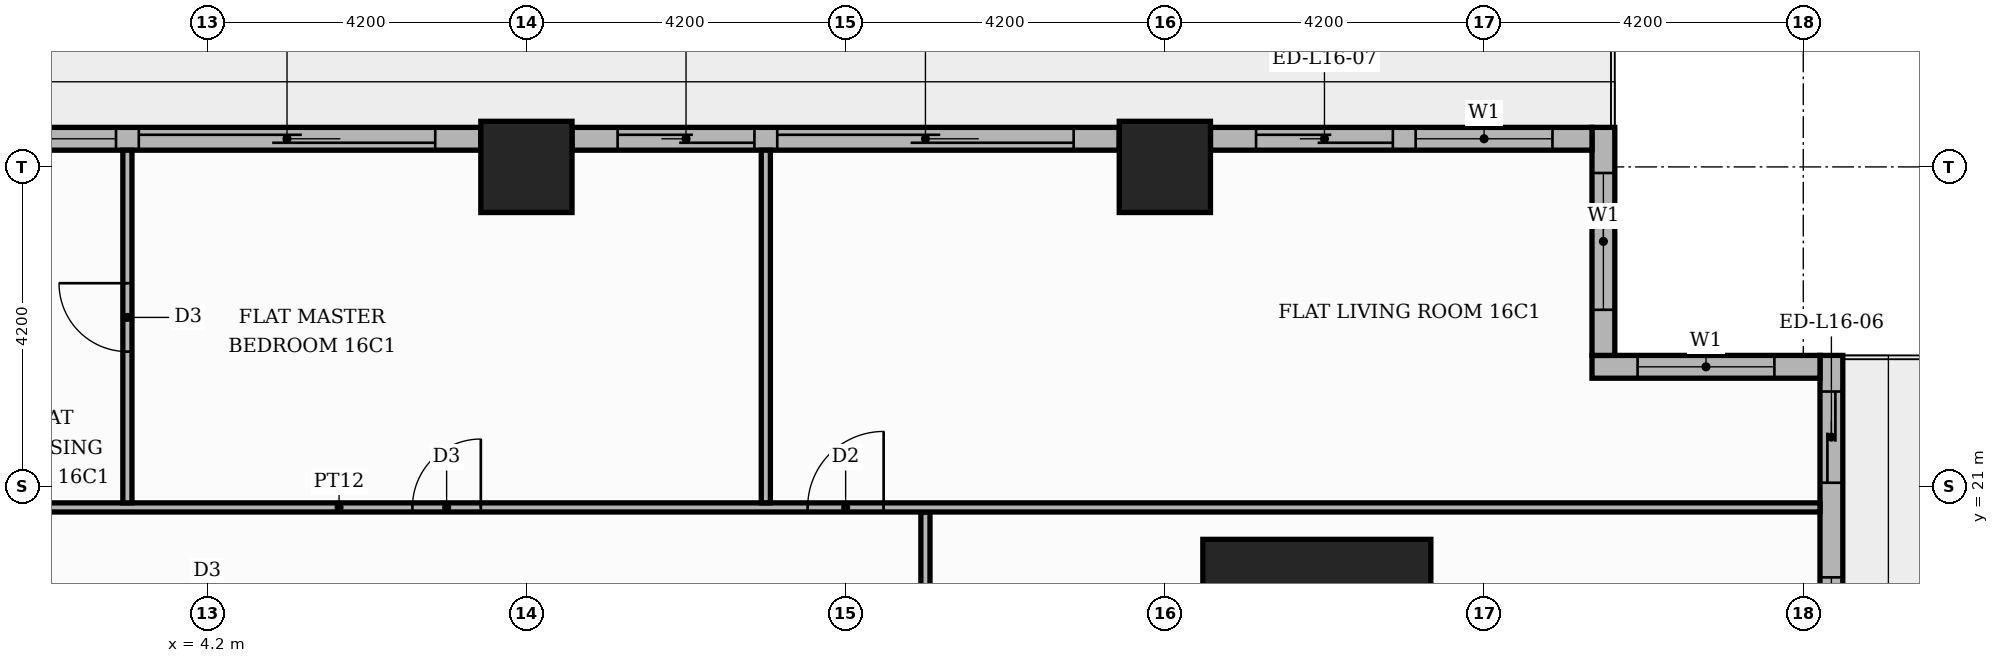
"""IFC4 building model, lengths in metres.
Left out: names, types, materials, properties, quantities, classifications, styles, units other than length and angle.
Written with IfcOpenShell. Run it as: python <this file> out.ifc"""

import sys

from ifc_helpers import new_model, si_unit, direction, frame, frame_2d, origin, origin_2d, place, context, subcontext, project, spatial, rectangle, extrude, element, fill, save


model = new_model("IFC4")
c1 = context("Model", 3, precision=1e-05, world=origin(), true_north=direction((0.0, 1.0)))
c2 = subcontext(c1, "Body", "Model", "MODEL_VIEW")
j1 = project(units=[si_unit("LENGTHUNIT", "METRE"), si_unit("PLANEANGLEUNIT", "RADIAN")], contexts=[c1])
p1 = place(None, origin())
s1 = spatial("IfcSite", under=j1, at=p1, CompositionType="ELEMENT")
p2 = place(p1, origin())
s2 = spatial("IfcBuilding", under=s1, at=p2, CompositionType="ELEMENT")
p3 = place(p2, frame((0.0, 0.0, 69.9)))
s3 = spatial("IfcBuildingStorey", under=s2, at=p3, CompositionType="ELEMENT", Elevation=69.9)
p4 = place(p3, frame((18.8, 18.8, 0.0), z_axis=(0.0, 0.0, 1.0), x_axis=(1.0, 0.0, 0.0)))
e1 = element("IfcColumn", 1, at=p4, inside=s3, PredefinedType="COLUMN", context=c2, shape_type="SweptSolid", body=[
    extrude(rectangle(XDim=3.0, YDim=3.0, at=origin_2d()), origin(), (0.0, 0.0, 1.0), 3.9),
])
for number, where, z_axis, x_axis in (
    (2, (8.4, 25.2, 0.0), (0.0, 0.0, 1.0), (1.0, 0.0, 0.0)),
    (3, (16.8, 25.2, 0.0), (0.0, 0.0, 1.0), (1.0, 0.0, 0.0)),
):
    element("IfcColumn", number, at=place(p3, frame(where, z_axis=z_axis, x_axis=x_axis)), inside=s3, PredefinedType="COLUMN", context=c2, shape_type="SweptSolid", body=[
        extrude(rectangle(XDim=1.2, YDim=1.2, at=origin_2d()), origin(), (0.0, 0.0, 1.0), 3.9),
    ])
p5 = place(p3, frame((25.57, 17.4, 0.0), z_axis=(0.0, 0.0, 1.0), x_axis=(0.0, 1.0, 0.0)))
e4 = element("IfcWall", 4, at=p5, inside=s3, PredefinedType="STANDARD", context=c2, shape_type="SweptSolid", body=[
    extrude(rectangle(XDim=5.32, YDim=0.3, at=frame_2d((2.66, 0.0))), origin(), (0.0, 0.0, 1.0), 3.4),
])
p6 = place(p5, frame((0.6, 0.0, 0.9)))
e5 = element("IfcOpeningElement", 5, at=p6, cuts=e4, PredefinedType="OPENING", context=c2, shape_type="SweptSolid", body=[
    extrude(rectangle(XDim=1.8, YDim=2.1, at=frame_2d((0.9, 1.05))), frame((0.0, 0.16, 0.0), z_axis=(0.0, -1.0, 0.0), x_axis=(1.0, 0.0, 0.0)), (0.0, 0.0, 1.0), 0.32),
])
p7 = place(p5, frame((3.645, 0.0, 0.0)))
e6 = element("IfcOpeningElement", 6, at=p7, cuts=e4, PredefinedType="OPENING", context=c2, shape_type="SweptSolid", body=[
    extrude(rectangle(XDim=1.2, YDim=2.4, at=frame_2d((0.6, 1.2))), frame((0.0, 0.16, 0.0), z_axis=(0.0, -1.0, 0.0), x_axis=(1.0, 0.0, 0.0)), (0.0, 0.0, 1.0), 0.32),
])
p8 = place(p3, frame((25.42, 22.57, 0.0), z_axis=(0.0, 0.0, 1.0), x_axis=(-1.0, 0.0, 0.0)))
e7 = element("IfcWall", 7, at=p8, inside=s3, PredefinedType="STANDARD", context=c2, shape_type="SweptSolid", body=[
    extrude(rectangle(XDim=3.0, YDim=0.3, at=frame_2d((1.5, 0.0))), origin(), (0.0, 0.0, 1.0), 3.4),
])
p9 = place(p8, frame((0.6, 0.0, 0.9)))
e8 = element("IfcOpeningElement", 8, at=p9, cuts=e7, PredefinedType="OPENING", context=c2, shape_type="SweptSolid", body=[
    extrude(rectangle(XDim=1.8, YDim=2.1, at=frame_2d((0.9, 1.05))), frame((0.0, 0.16, 0.0), z_axis=(0.0, -1.0, 0.0), x_axis=(1.0, 0.0, 0.0)), (0.0, 0.0, 1.0), 0.32),
])
p10 = place(p3, frame((22.57, 22.72, 0.0), z_axis=(0.0, 0.0, 1.0), x_axis=(0.0, 1.0, 0.0)))
e9 = element("IfcWall", 9, at=p10, inside=s3, PredefinedType="STANDARD", context=c2, shape_type="SweptSolid", body=[
    extrude(rectangle(XDim=3.0, YDim=0.3, at=frame_2d((1.5, 0.0))), origin(), (0.0, 0.0, 1.0), 3.4),
])
p11 = place(p10, frame((0.6, 0.0, 0.9)))
e10 = element("IfcOpeningElement", 10, at=p11, cuts=e9, PredefinedType="OPENING", context=c2, shape_type="SweptSolid", body=[
    extrude(rectangle(XDim=1.8, YDim=2.1, at=frame_2d((0.9, 1.05))), frame((0.0, 0.16, 0.0), z_axis=(0.0, -1.0, 0.0), x_axis=(1.0, 0.0, 0.0)), (0.0, 0.0, 1.0), 0.32),
])
p12 = place(p3, frame((22.42, 25.57, 0.0), z_axis=(0.0, 0.0, 1.0), x_axis=(-1.0, 0.0, 0.0)))
e11 = element("IfcWall", 11, at=p12, inside=s3, PredefinedType="STANDARD", context=c2, shape_type="SweptSolid", body=[
    extrude(rectangle(XDim=5.02, YDim=0.3, at=frame_2d((2.51, 0.0))), origin(), (0.0, 0.0, 1.0), 3.4),
])
p13 = place(p12, frame((0.52, 0.0, 0.9)))
e12 = element("IfcOpeningElement", 12, at=p13, cuts=e11, PredefinedType="OPENING", context=c2, shape_type="SweptSolid", body=[
    extrude(rectangle(XDim=1.8, YDim=2.1, at=frame_2d((0.9, 1.05))), frame((0.0, 0.16, 0.0), z_axis=(0.0, -1.0, 0.0), x_axis=(1.0, 0.0, 0.0)), (0.0, 0.0, 1.0), 0.32),
])
p14 = place(p12, frame((2.62, 0.0, 0.0)))
e13 = element("IfcOpeningElement", 13, at=p14, cuts=e11, PredefinedType="OPENING", context=c2, shape_type="SweptSolid", body=[
    extrude(rectangle(XDim=1.8, YDim=2.4, at=frame_2d((0.9, 1.2))), frame((0.0, 0.16, 0.0), z_axis=(0.0, -1.0, 0.0), x_axis=(1.0, 0.0, 0.0)), (0.0, 0.0, 1.0), 0.32),
])
p15 = place(p3, frame((16.2, 25.57, 0.0), z_axis=(0.0, 0.0, 1.0), x_axis=(-1.0, 0.0, 0.0)))
e14 = element("IfcWall", 14, at=p15, inside=s3, PredefinedType="STANDARD", context=c2, shape_type="SweptSolid", body=[
    extrude(rectangle(XDim=7.2, YDim=0.3, at=frame_2d((3.6, 0.0))), origin(), (0.0, 0.0, 1.0), 3.4),
])
p16 = place(p15, frame((0.6, 0.0, 0.0)))
e15 = element("IfcOpeningElement", 15, at=p16, cuts=e14, PredefinedType="OPENING", context=c2, shape_type="SweptSolid", body=[
    extrude(rectangle(XDim=3.9, YDim=2.4, at=frame_2d((1.95, 1.2))), frame((0.0, 0.16, 0.0), z_axis=(0.0, -1.0, 0.0), x_axis=(1.0, 0.0, 0.0)), (0.0, 0.0, 1.0), 0.32),
])
p17 = place(p15, frame((4.8, 0.0, 0.0)))
e16 = element("IfcOpeningElement", 16, at=p17, cuts=e14, PredefinedType="OPENING", context=c2, shape_type="SweptSolid", body=[
    extrude(rectangle(XDim=1.8, YDim=2.4, at=frame_2d((0.9, 1.2))), frame((0.0, 0.16, 0.0), z_axis=(0.0, -1.0, 0.0), x_axis=(1.0, 0.0, 0.0)), (0.0, 0.0, 1.0), 0.32),
])
p18 = place(p3, frame((7.8, 25.57, 0.0), z_axis=(0.0, 0.0, 1.0), x_axis=(-1.0, 0.0, 0.0)))
e17 = element("IfcWall", 17, at=p18, inside=s3, PredefinedType="STANDARD", context=c2, shape_type="SweptSolid", body=[
    extrude(rectangle(XDim=7.2, YDim=0.3, at=frame_2d((3.6, 0.0))), origin(), (0.0, 0.0, 1.0), 3.4),
])
p19 = place(p18, frame((0.6, 0.0, 0.0)))
e18 = element("IfcOpeningElement", 18, at=p19, cuts=e17, PredefinedType="OPENING", context=c2, shape_type="SweptSolid", body=[
    extrude(rectangle(XDim=3.9, YDim=2.4, at=frame_2d((1.95, 1.2))), frame((0.0, 0.16, 0.0), z_axis=(0.0, -1.0, 0.0), x_axis=(1.0, 0.0, 0.0)), (0.0, 0.0, 1.0), 0.32),
])
p20 = place(p18, frame((4.8, 0.0, 0.9)))
e19 = element("IfcOpeningElement", 19, at=p20, cuts=e17, PredefinedType="OPENING", context=c2, shape_type="SweptSolid", body=[
    extrude(rectangle(XDim=1.8, YDim=2.1, at=frame_2d((0.9, 1.05))), frame((0.0, 0.16, 0.0), z_axis=(0.0, -1.0, 0.0), x_axis=(1.0, 0.0, 0.0)), (0.0, 0.0, 1.0), 0.32),
])
p21 = place(p3, frame((13.65, 13.75, 0.0), z_axis=(0.0, 0.0, 1.0), x_axis=(0.0, 1.0, 0.0)))
e20 = element("IfcWall", 20, at=p21, inside=s3, PredefinedType="PARTITIONING", context=c2, shape_type="SweptSolid", body=[
    extrude(rectangle(XDim=6.91, YDim=0.12, at=frame_2d((3.455, 0.0))), origin(), (0.0, 0.0, 1.0), 3.4),
])
p22 = place(p21, frame((2.935, 0.0, 0.0)))
e21 = element("IfcOpeningElement", 21, at=p22, cuts=e20, PredefinedType="OPENING", context=c2, shape_type="SweptSolid", body=[
    extrude(rectangle(XDim=1.0, YDim=2.1, at=frame_2d((0.5, 1.05))), frame((0.0, 0.07, 0.0), z_axis=(0.0, -1.0, 0.0), x_axis=(1.0, 0.0, 0.0)), (0.0, 0.0, 1.0), 0.14),
])
p23 = place(p3, frame((-13.55, 20.72, 0.0), z_axis=(0.0, 0.0, 1.0), x_axis=(1.0, 0.0, 0.0)))
e22 = element("IfcWall", 22, at=p23, inside=s3, PredefinedType="PARTITIONING", context=c2, shape_type="SweptSolid", body=[
    extrude(rectangle(XDim=38.97, YDim=0.12, at=frame_2d((19.485, 0.0))), origin(), (0.0, 0.0, 1.0), 3.4),
])
p24 = place(p23, frame((25.65, 0.0, 0.0)))
e23 = element("IfcOpeningElement", 23, at=p24, cuts=e22, PredefinedType="OPENING", context=c2, shape_type="SweptSolid", body=[
    extrude(rectangle(XDim=1.0, YDim=2.1, at=frame_2d((0.5, 1.05))), frame((0.0, 0.07, 0.0), z_axis=(0.0, -1.0, 0.0), x_axis=(1.0, 0.0, 0.0)), (0.0, 0.0, 1.0), 0.14),
])
p25 = place(p23, frame((20.45, 0.0, 0.0)))
e24 = element("IfcOpeningElement", 24, at=p25, cuts=e22, PredefinedType="OPENING", context=c2, shape_type="SweptSolid", body=[
    extrude(rectangle(XDim=0.9, YDim=2.1, at=frame_2d((0.45, 1.05))), frame((0.0, 0.07, 0.0), z_axis=(0.0, -1.0, 0.0), x_axis=(1.0, 0.0, 0.0)), (0.0, 0.0, 1.0), 0.14),
])
p26 = place(p23, frame((9.95, 0.0, 0.0)))
e25 = element("IfcOpeningElement", 25, at=p26, cuts=e22, PredefinedType="OPENING", context=c2, shape_type="SweptSolid", body=[
    extrude(rectangle(XDim=0.9, YDim=2.1, at=frame_2d((0.45, 1.05))), frame((0.0, 0.07, 0.0), z_axis=(0.0, -1.0, 0.0), x_axis=(1.0, 0.0, 0.0)), (0.0, 0.0, 1.0), 0.14),
])
p27 = place(p23, frame((2.6, 0.0, 0.0)))
e26 = element("IfcOpeningElement", 26, at=p27, cuts=e22, PredefinedType="OPENING", context=c2, shape_type="SweptSolid", body=[
    extrude(rectangle(XDim=0.9, YDim=2.1, at=frame_2d((0.45, 1.05))), frame((0.0, 0.07, 0.0), z_axis=(0.0, -1.0, 0.0), x_axis=(1.0, 0.0, 0.0)), (0.0, 0.0, 1.0), 0.14),
])
p28 = place(p3, frame((3.15, 20.78, 0.0), z_axis=(0.0, 0.0, 1.0), x_axis=(0.0, 1.0, 0.0)))
e27 = element("IfcWall", 27, at=p28, inside=s3, PredefinedType="PARTITIONING", context=c2, shape_type="SweptSolid", body=[
    extrude(rectangle(XDim=4.64, YDim=0.12, at=frame_2d((2.32, 0.0))), origin(), (0.0, 0.0, 1.0), 3.4),
])
p29 = place(p28, frame((1.99, 0.0, 0.0)))
e28 = element("IfcOpeningElement", 28, at=p29, cuts=e27, PredefinedType="OPENING", context=c2, shape_type="SweptSolid", body=[
    extrude(rectangle(XDim=0.9, YDim=2.1, at=frame_2d((0.45, 1.05))), frame((0.0, 0.07, 0.0), z_axis=(0.0, -1.0, 0.0), x_axis=(1.0, 0.0, 0.0)), (0.0, 0.0, 1.0), 0.14),
])
p30 = place(p3, frame((11.55, 20.78, 0.0), z_axis=(0.0, 0.0, 1.0), x_axis=(0.0, 1.0, 0.0)))
e29 = element("IfcWall", 29, at=p30, inside=s3, PredefinedType="PARTITIONING", context=c2, shape_type="SweptSolid", body=[
    extrude(rectangle(XDim=4.64, YDim=0.12, at=frame_2d((2.32, 0.0))), origin(), (0.0, 0.0, 1.0), 3.4),
])
p31 = place(p6, origin())
e30 = element("IfcWindow", 30, at=p31, inside=s3, PartitioningType="SINGLE_PANEL", PredefinedType="WINDOW", context=c2, shape_type="SweptSolid", body=[
    extrude(rectangle(XDim=1.8, YDim=2.1, at=frame_2d((0.9, 1.05))), frame((0.0, 0.03, 0.0), z_axis=(0.0, -1.0, 0.0), x_axis=(1.0, 0.0, 0.0)), (0.0, 0.0, 1.0), 0.06),
])
fill(e5, e30)
p32 = place(p7, origin())
e31 = element("IfcDoor", 31, at=p32, inside=s3, OperationType="SLIDING_TO_RIGHT", PredefinedType="DOOR", context=c2, shape_type="SweptSolid", body=[
    extrude(rectangle(XDim=1.2, YDim=2.4, at=frame_2d((0.6, 1.2))), frame((0.0, 0.025, 0.0), z_axis=(0.0, -1.0, 0.0), x_axis=(1.0, 0.0, 0.0)), (0.0, 0.0, 1.0), 0.05),
])
fill(e6, e31)
p33 = place(p9, origin())
e32 = element("IfcWindow", 32, at=p33, inside=s3, PartitioningType="SINGLE_PANEL", PredefinedType="WINDOW", context=c2, shape_type="SweptSolid", body=[
    extrude(rectangle(XDim=1.8, YDim=2.1, at=frame_2d((0.9, 1.05))), frame((0.0, 0.03, 0.0), z_axis=(0.0, -1.0, 0.0), x_axis=(1.0, 0.0, 0.0)), (0.0, 0.0, 1.0), 0.06),
])
fill(e8, e32)
p34 = place(p11, origin())
e33 = element("IfcWindow", 33, at=p34, inside=s3, PartitioningType="SINGLE_PANEL", PredefinedType="WINDOW", context=c2, shape_type="SweptSolid", body=[
    extrude(rectangle(XDim=1.8, YDim=2.1, at=frame_2d((0.9, 1.05))), frame((0.0, 0.03, 0.0), z_axis=(0.0, -1.0, 0.0), x_axis=(1.0, 0.0, 0.0)), (0.0, 0.0, 1.0), 0.06),
])
fill(e10, e33)
p35 = place(p13, origin())
e34 = element("IfcWindow", 34, at=p35, inside=s3, PartitioningType="SINGLE_PANEL", PredefinedType="WINDOW", context=c2, shape_type="SweptSolid", body=[
    extrude(rectangle(XDim=1.8, YDim=2.1, at=frame_2d((0.9, 1.05))), frame((0.0, 0.03, 0.0), z_axis=(0.0, -1.0, 0.0), x_axis=(1.0, 0.0, 0.0)), (0.0, 0.0, 1.0), 0.06),
])
fill(e12, e34)
p36 = place(p14, origin())
e35 = element("IfcDoor", 35, at=p36, inside=s3, OperationType="SLIDING_TO_RIGHT", PredefinedType="DOOR", context=c2, shape_type="SweptSolid", body=[
    extrude(rectangle(XDim=1.8, YDim=2.4, at=frame_2d((0.9, 1.2))), frame((0.0, 0.025, 0.0), z_axis=(0.0, -1.0, 0.0), x_axis=(1.0, 0.0, 0.0)), (0.0, 0.0, 1.0), 0.05),
])
fill(e13, e35)
p37 = place(p16, origin())
e36 = element("IfcDoor", 36, at=p37, inside=s3, OperationType="SLIDING_TO_LEFT", PredefinedType="DOOR", context=c2, shape_type="SweptSolid", body=[
    extrude(rectangle(XDim=3.9, YDim=2.4, at=frame_2d((1.95, 1.2))), frame((0.0, 0.025, 0.0), z_axis=(0.0, -1.0, 0.0), x_axis=(1.0, 0.0, 0.0)), (0.0, 0.0, 1.0), 0.05),
])
fill(e15, e36)
p38 = place(p17, origin())
e37 = element("IfcDoor", 37, at=p38, inside=s3, OperationType="SLIDING_TO_RIGHT", PredefinedType="DOOR", context=c2, shape_type="SweptSolid", body=[
    extrude(rectangle(XDim=1.8, YDim=2.4, at=frame_2d((0.9, 1.2))), frame((0.0, 0.025, 0.0), z_axis=(0.0, -1.0, 0.0), x_axis=(1.0, 0.0, 0.0)), (0.0, 0.0, 1.0), 0.05),
])
fill(e16, e37)
p39 = place(p19, origin())
e38 = element("IfcDoor", 38, at=p39, inside=s3, OperationType="SLIDING_TO_LEFT", PredefinedType="DOOR", context=c2, shape_type="SweptSolid", body=[
    extrude(rectangle(XDim=3.9, YDim=2.4, at=frame_2d((1.95, 1.2))), frame((0.0, 0.025, 0.0), z_axis=(0.0, -1.0, 0.0), x_axis=(1.0, 0.0, 0.0)), (0.0, 0.0, 1.0), 0.05),
])
fill(e18, e38)
p40 = place(p20, origin())
e39 = element("IfcWindow", 39, at=p40, inside=s3, PartitioningType="SINGLE_PANEL", PredefinedType="WINDOW", context=c2, shape_type="SweptSolid", body=[
    extrude(rectangle(XDim=1.8, YDim=2.1, at=frame_2d((0.9, 1.05))), frame((0.0, 0.03, 0.0), z_axis=(0.0, -1.0, 0.0), x_axis=(1.0, 0.0, 0.0)), (0.0, 0.0, 1.0), 0.06),
])
fill(e19, e39)
p41 = place(p24, origin())
e40 = element("IfcDoor", 40, at=p41, inside=s3, OperationType="SINGLE_SWING_RIGHT", PredefinedType="DOOR", context=c2, shape_type="SweptSolid", body=[
    extrude(rectangle(XDim=1.0, YDim=2.1, at=frame_2d((0.5, 1.05))), frame((0.0, 0.025, 0.0), z_axis=(0.0, -1.0, 0.0), x_axis=(1.0, 0.0, 0.0)), (0.0, 0.0, 1.0), 0.05),
])
fill(e23, e40)
p42 = place(p25, origin())
e41 = element("IfcDoor", 41, at=p42, inside=s3, OperationType="SINGLE_SWING_RIGHT", PredefinedType="DOOR", context=c2, shape_type="SweptSolid", body=[
    extrude(rectangle(XDim=0.9, YDim=2.1, at=frame_2d((0.45, 1.05))), frame((0.0, 0.025, 0.0), z_axis=(0.0, -1.0, 0.0), x_axis=(1.0, 0.0, 0.0)), (0.0, 0.0, 1.0), 0.05),
])
fill(e24, e41)
p43 = place(p29, origin())
e42 = element("IfcDoor", 42, at=p43, inside=s3, OperationType="SINGLE_SWING_RIGHT", PredefinedType="DOOR", context=c2, shape_type="SweptSolid", body=[
    extrude(rectangle(XDim=0.9, YDim=2.1, at=frame_2d((0.45, 1.05))), frame((0.0, 0.025, 0.0), z_axis=(0.0, -1.0, 0.0), x_axis=(1.0, 0.0, 0.0)), (0.0, 0.0, 1.0), 0.05),
])
fill(e28, e42)
save(model, sys.argv[1])
